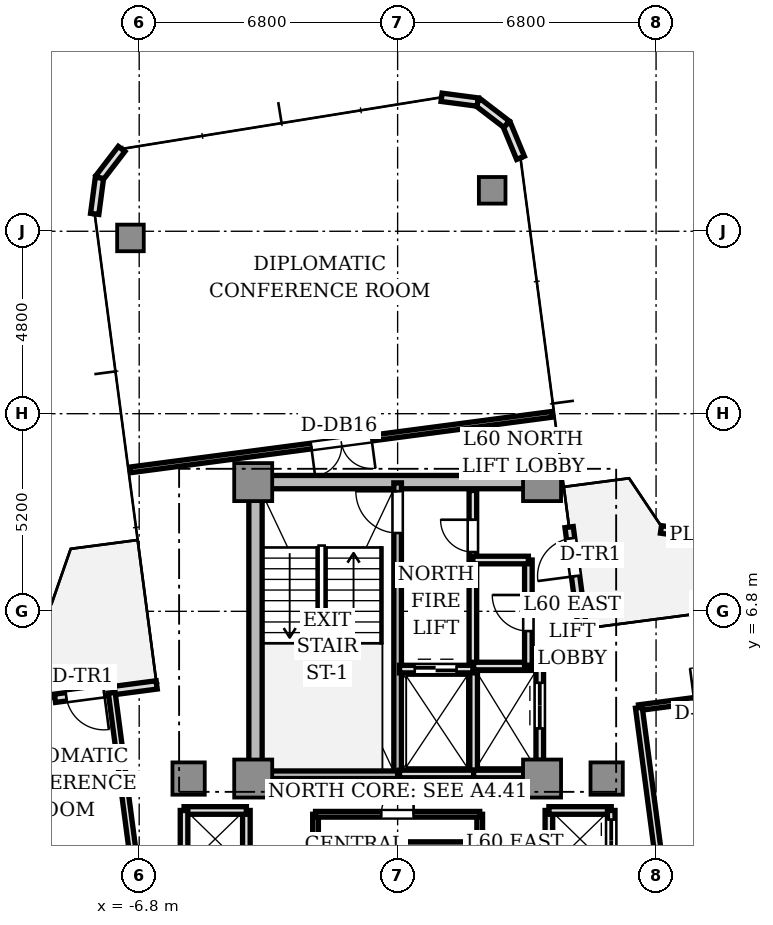
"""IFC4 building model, lengths in metres.
Left out: names, types, materials, properties, quantities, classifications, styles, units other than length and angle.
Written with IfcOpenShell. Run it as: python <this file> out.ifc"""

import sys

from ifc_helpers import new_model, si_unit, direction, frame, frame_2d, origin, origin_2d, place, context, subcontext, project, spatial, rectangle, extrude, source, transform, mapped, element, fill, save


model = new_model("IFC4")
c1 = context("Model", 3, precision=1e-05, world=origin(), true_north=direction((0.0, 1.0)))
c2 = subcontext(c1, "Body", "Model", "MODEL_VIEW")
j1 = project(units=[si_unit("LENGTHUNIT", "METRE"), si_unit("PLANEANGLEUNIT", "RADIAN")], contexts=[c1])
p1 = place(None, origin())
s1 = spatial("IfcSite", under=j1, at=p1, CompositionType="ELEMENT")
p2 = place(p1, origin())
s2 = spatial("IfcBuilding", under=s1, at=p2, CompositionType="ELEMENT")
p3 = place(p2, frame((0.0, 0.0, 216.55)))
s3 = spatial("IfcBuildingStorey", under=s2, at=p3, CompositionType="ELEMENT", Elevation=216.55)
p4 = place(p3, frame((-3.55, 10.2, 0.0), z_axis=(0.0, 0.0, 1.0), x_axis=(1.0, 0.0, 0.0)))
e1 = element("IfcWall", 1, at=p4, inside=s3, PredefinedType="SHEAR", context=c2, shape_type="SweptSolid", body=[
    extrude(rectangle(XDim=7.1, YDim=0.35, at=frame_2d((3.55, 0.0))), origin(), (0.0, 0.0, 1.0), 3.11),
])
p5 = place(p3, frame((-3.74, 2.85, 0.0), z_axis=(0.0, 0.0, 1.0), x_axis=(0.0, 1.0, 0.0)))
e2 = element("IfcWall", 2, at=p5, inside=s3, PredefinedType="SHEAR", context=c2, shape_type="SweptSolid", body=[
    extrude(rectangle(XDim=6.9, YDim=0.35, at=frame_2d((3.45, 0.0))), origin(), (0.0, 0.0, 1.0), 3.11),
])
m1 = source(origin(), c2, "Body", "SweptSolid", [
    extrude(rectangle(XDim=1.0, YDim=1.0, at=origin_2d()), origin(), (0.0, 0.0, 1.0), 3.11),
])
for number, where, z_axis, x_axis in (
    (3, (-3.8, 2.4, 0.0), (0.0, 0.0, 1.0), (1.0, 0.0, 0.0)),
    (4, (3.8, 2.4, 0.0), (0.0, 0.0, 1.0), (1.0, 0.0, 0.0)),
    (5, (-3.8, 10.2, 0.0), (0.0, 0.0, 1.0), (1.0, 0.0, 0.0)),
    (6, (3.8, 10.2, 0.0), (0.0, 0.0, 1.0), (1.0, 0.0, 0.0)),
):
    element("IfcColumn", number, at=place(p3, frame(where, z_axis=z_axis, x_axis=x_axis)), inside=s3, PredefinedType="COLUMN", context=c2, shape_type="MappedRepresentation", body=[
        mapped(m1, transform((0.0, 0.0, 0.0), scale=1.0)),
    ])
m2 = source(origin(), c2, "Body", "SweptSolid", [
    extrude(rectangle(XDim=0.85, YDim=0.85, at=origin_2d()), origin(), (0.0, 0.0, 1.0), 3.11),
])
for number, where, z_axis, x_axis in (
    (7, (5.5, 2.4, 0.0), (0.0, 0.0, 1.0), (1.0, 0.0, 0.0)),
    (8, (-5.5, 2.4, 0.0), (0.0, 0.0, 1.0), (1.0, 0.0, 0.0)),
):
    element("IfcColumn", number, at=place(p3, frame(where, z_axis=z_axis, x_axis=x_axis)), inside=s3, PredefinedType="COLUMN", context=c2, shape_type="MappedRepresentation", body=[
        mapped(m2, transform((0.0, 0.0, 0.0), scale=1.0)),
    ])
m3 = source(origin(), c2, "Body", "SweptSolid", [
    extrude(rectangle(XDim=0.7, YDim=0.7, at=origin_2d()), origin(), (0.0, 0.0, 1.0), 3.11),
])
for number, where, z_axis, x_axis in (
    (9, (2.488, 17.878, 0.0), (0.0, 0.0, 1.0), (1.0, 0.0, 0.0)),
    (10, (-7.03, 16.625, 0.0), (0.0, 0.0, 1.0), (1.0, 0.0, 0.0)),
):
    element("IfcColumn", number, at=place(p3, frame(where, z_axis=z_axis, x_axis=x_axis)), inside=s3, PredefinedType="COLUMN", context=c2, shape_type="MappedRepresentation", body=[
        mapped(m3, transform((0.0, 0.0, 0.0), scale=1.0)),
    ])
p6 = place(p3, frame((4.864, 6.339, 0.0), z_axis=(0.0, 0.0, 1.0), x_axis=(-0.130564442062, 0.991439824936, 0.0)))
e11 = element("IfcWall", 11, at=p6, inside=s3, PredefinedType="STANDARD", context=c2, shape_type="SweptSolid", body=[
    extrude(rectangle(XDim=2.7, YDim=0.22, at=frame_2d((1.35, 0.0))), origin(), (0.0, 0.0, 1.0), 3.11),
])
p7 = place(p6, frame((1.4, 0.0, 0.0)))
e12 = element("IfcOpeningElement", 12, at=p7, cuts=e11, PredefinedType="OPENING", context=c2, shape_type="SweptSolid", body=[
    extrude(rectangle(XDim=1.0, YDim=2.2, at=frame_2d((0.5, 1.1))), frame((0.0, 0.12, 0.0), z_axis=(0.0, -1.0, 0.0), x_axis=(1.0, 0.0, 0.0)), (0.0, 0.0, 1.0), 0.24),
])
for number, where, z_axis, x_axis in (
    (13, (3.233, 18.732, 0.0), (0.0, 0.0, 1.0), (-0.383, 0.924, 0.0)),
    (14, (2.866, 19.617, 0.0), (0.0, 0.0, 1.0), (-0.793, 0.609, 0.0)),
    (15, (2.106, 20.2, 0.0), (0.0, 0.0, 1.0), (-0.991, 0.131, 0.0)),
):
    element("IfcWall", number, at=place(p3, frame(where, z_axis=z_axis, x_axis=x_axis)), inside=s3, PredefinedType="STANDARD", context=c2, shape_type="SweptSolid", body=[
        extrude(rectangle(XDim=0.958, YDim=0.22, at=frame_2d((0.479, 0.0))), origin(), (0.0, 0.0, 1.0), 3.11),
    ])
p8 = place(p3, frame((-7.263, 18.966, 0.0), z_axis=(0.0, 0.0, 1.0), x_axis=(-0.608897151398, -0.793249178392, 0.0)))
e16 = element("IfcWall", 16, at=p8, inside=s3, PredefinedType="STANDARD", context=c2, shape_type="SweptSolid", body=[
    extrude(rectangle(XDim=0.958, YDim=0.22, at=frame_2d((0.479, 0.0))), origin(), (0.0, 0.0, 1.0), 3.11),
])
p9 = place(p3, frame((-7.846, 18.207, 0.0), z_axis=(0.0, 0.0, 1.0), x_axis=(-0.130527053476, -0.991444747987, 0.0)))
e17 = element("IfcWall", 17, at=p9, inside=s3, PredefinedType="STANDARD", context=c2, shape_type="SweptSolid", body=[
    extrude(rectangle(XDim=0.958, YDim=0.22, at=frame_2d((0.479, 0.0))), origin(), (0.0, 0.0, 1.0), 3.11),
])
p10 = place(p3, frame((-6.339, 4.864, 0.0), z_axis=(0.0, 0.0, 1.0), x_axis=(-0.991439824936, -0.130564442062, 0.0)))
e18 = element("IfcWall", 18, at=p10, inside=s3, PredefinedType="STANDARD", context=c2, shape_type="SweptSolid", body=[
    extrude(rectangle(XDim=2.7, YDim=0.22, at=frame_2d((1.35, 0.0))), origin(), (0.0, 0.0, 1.0), 3.11),
])
p11 = place(p10, frame((1.4, 0.0, 0.0)))
e19 = element("IfcOpeningElement", 19, at=p11, cuts=e18, PredefinedType="OPENING", context=c2, shape_type="SweptSolid", body=[
    extrude(rectangle(XDim=1.0, YDim=2.2, at=frame_2d((0.5, 1.1))), frame((0.0, 0.12, 0.0), z_axis=(0.0, -1.0, 0.0), x_axis=(1.0, 0.0, 0.0)), (0.0, 0.0, 1.0), 0.24),
])
p12 = place(p3, frame((8.972, 8.667, 0.0), z_axis=(0.0, 0.0, 1.0), x_axis=(-0.990194035803, 0.139698859907, 0.0)))
e20 = element("IfcWall", 20, at=p12, inside=s3, PredefinedType="PARAPET", context=c2, shape_type="SweptSolid", body=[
    extrude(rectangle(XDim=2.064, YDim=0.2, at=frame_2d((1.032, 0.0))), origin(), (0.0, 0.0, 1.0), 0.65),
])
p13 = place(p3, frame((0.0, 2.5, 0.0), z_axis=(0.0, 0.0, 1.0), x_axis=(0.0, 1.0, 0.0)))
e21 = element("IfcWall", 21, at=p13, inside=s3, PredefinedType="SOLIDWALL", context=c2, shape_type="SweptSolid", body=[
    extrude(rectangle(XDim=7.68, YDim=0.2, at=frame_2d((3.84, 0.0))), origin(), (0.0, 0.0, 1.0), 3.11),
])
p14 = place(p13, frame((6.36, 0.0, 0.0)))
e22 = element("IfcOpeningElement", 22, at=p14, cuts=e21, PredefinedType="OPENING", context=c2, shape_type="SweptSolid", body=[
    extrude(rectangle(XDim=1.1, YDim=2.15, at=frame_2d((0.55, 1.075))), frame((0.0, 0.11, 0.0), z_axis=(0.0, -1.0, 0.0), x_axis=(1.0, 0.0, 0.0)), (0.0, 0.0, 1.0), 0.22),
])
p15 = place(p3, frame((-3.72, 2.5, 0.0), z_axis=(0.0, 0.0, 1.0), x_axis=(1.0, 0.0, 0.0)))
e23 = element("IfcWall", 23, at=p15, inside=s3, PredefinedType="SOLIDWALL", context=c2, shape_type="SweptSolid", body=[
    extrude(rectangle(XDim=3.72, YDim=0.2, at=frame_2d((1.86, 0.0))), origin(), (0.0, 0.0, 1.0), 3.11),
])
p16 = place(p3, frame((1.98, 5.32, 0.0), z_axis=(0.0, 0.0, 1.0), x_axis=(0.0, 1.0, 0.0)))
e24 = element("IfcWall", 24, at=p16, inside=s3, PredefinedType="SOLIDWALL", context=c2, shape_type="SweptSolid", body=[
    extrude(rectangle(XDim=4.66, YDim=0.2, at=frame_2d((2.33, 0.0))), origin(), (0.0, 0.0, 1.0), 2.66),
])
p17 = place(p16, frame((3.04, 0.0, 0.0)))
e25 = element("IfcOpeningElement", 25, at=p17, cuts=e24, PredefinedType="OPENING", context=c2, shape_type="SweptSolid", body=[
    extrude(rectangle(XDim=0.85, YDim=2.1, at=frame_2d((0.425, 1.05))), frame((0.0, 0.11, 0.0), z_axis=(0.0, -1.0, 0.0), x_axis=(1.0, 0.0, 0.0)), (0.0, 0.0, 1.0), 0.22),
])
p18 = place(p3, frame((2.0, 2.5, 0.0), z_axis=(0.0, 0.0, 1.0), x_axis=(0.0, 1.0, 0.0)))
e26 = element("IfcWall", 26, at=p18, inside=s3, PredefinedType="SOLIDWALL", context=c2, shape_type="SweptSolid", body=[
    extrude(rectangle(XDim=2.78, YDim=0.2, at=frame_2d((1.39, 0.0))), origin(), (0.0, 0.0, 1.0), 2.66),
])
p19 = place(p3, frame((0.05, 2.52, 0.0), z_axis=(0.0, 0.0, 1.0), x_axis=(1.0, 0.0, 0.0)))
e27 = element("IfcWall", 27, at=p19, inside=s3, PredefinedType="SOLIDWALL", context=c2, shape_type="SweptSolid", body=[
    extrude(rectangle(XDim=1.95, YDim=0.2, at=frame_2d((0.975, 0.0))), origin(), (0.0, 0.0, 1.0), 2.66),
])
p20 = place(p3, frame((0.05, 5.28, 0.0), z_axis=(0.0, 0.0, 1.0), x_axis=(1.0, 0.0, 0.0)))
e28 = element("IfcWall", 28, at=p20, inside=s3, PredefinedType="SOLIDWALL", context=c2, shape_type="SweptSolid", body=[
    extrude(rectangle(XDim=1.93, YDim=0.2, at=frame_2d((0.965, 0.0))), origin(), (0.0, 0.0, 1.0), 2.66),
])
p21 = place(p20, frame((0.4, 0.0, 0.0)))
e29 = element("IfcOpeningElement", 29, at=p21, cuts=e28, PredefinedType="OPENING", context=c2, shape_type="SweptSolid", body=[
    extrude(rectangle(XDim=1.1, YDim=2.2, at=frame_2d((0.55, 1.1))), frame((0.0, 0.11, 0.0), z_axis=(0.0, -1.0, 0.0), x_axis=(1.0, 0.0, 0.0)), (0.0, 0.0, 1.0), 0.22),
])
p22 = place(p3, frame((2.0, 2.52, 0.0), z_axis=(0.0, 0.0, 1.0), x_axis=(1.0, 0.0, 0.0)))
e30 = element("IfcWall", 30, at=p22, inside=s3, PredefinedType="SOLIDWALL", context=c2, shape_type="SweptSolid", body=[
    extrude(rectangle(XDim=1.32, YDim=0.2, at=frame_2d((0.66, 0.0))), origin(), (0.0, 0.0, 1.0), 2.66),
])
p23 = place(p3, frame((2.0, 5.36, 0.0), z_axis=(0.0, 0.0, 1.0), x_axis=(1.0, 0.0, 0.0)))
e31 = element("IfcWall", 31, at=p23, inside=s3, PredefinedType="SOLIDWALL", context=c2, shape_type="SweptSolid", body=[
    extrude(rectangle(XDim=1.74, YDim=0.2, at=frame_2d((0.87, 0.0))), origin(), (0.0, 0.0, 1.0), 2.66),
])
p24 = place(p3, frame((3.74, 2.88, 0.0), z_axis=(0.0, 0.0, 1.0), x_axis=(0.0, 1.0, 0.0)))
e32 = element("IfcWall", 32, at=p24, inside=s3, PredefinedType="SOLIDWALL", context=c2, shape_type="SweptSolid", body=[
    extrude(rectangle(XDim=2.48, YDim=0.2, at=frame_2d((1.24, 0.0))), origin(), (0.0, 0.0, 1.0), 2.66),
])
p25 = place(p24, frame((0.84, 0.0, 0.0)))
e33 = element("IfcOpeningElement", 33, at=p25, cuts=e32, PredefinedType="OPENING", context=c2, shape_type="SweptSolid", body=[
    extrude(rectangle(XDim=1.2, YDim=2.2, at=frame_2d((0.6, 1.1))), frame((0.0, 0.11, 0.0), z_axis=(0.0, -1.0, 0.0), x_axis=(1.0, 0.0, 0.0)), (0.0, 0.0, 1.0), 0.22),
])
p26 = place(p3, frame((3.98, -1.56, 0.0), z_axis=(0.0, 0.0, 1.0), x_axis=(0.0, 1.0, 0.0)))
e34 = element("IfcWall", 34, at=p26, inside=s3, PredefinedType="SOLIDWALL", context=c2, shape_type="SweptSolid", body=[
    extrude(rectangle(XDim=3.12, YDim=0.2, at=frame_2d((1.56, 0.0))), origin(), (0.0, 0.0, 1.0), 2.33),
])
p27 = place(p3, frame((3.98, 1.56, 0.0), z_axis=(0.0, 0.0, 1.0), x_axis=(1.0, 0.0, 0.0)))
e35 = element("IfcWall", 35, at=p27, inside=s3, PredefinedType="SOLIDWALL", context=c2, shape_type="SweptSolid", body=[
    extrude(rectangle(XDim=1.64, YDim=0.2, at=frame_2d((0.82, 0.0))), origin(), (0.0, 0.0, 1.0), 2.66),
])
p28 = place(p3, frame((5.62, 0.0, 0.0), z_axis=(0.0, 0.0, 1.0), x_axis=(0.0, 1.0, 0.0)))
e36 = element("IfcWall", 36, at=p28, inside=s3, PredefinedType="SOLIDWALL", context=c2, shape_type="SweptSolid", body=[
    extrude(rectangle(XDim=1.56, YDim=0.2, at=frame_2d((0.78, 0.0))), origin(), (0.0, 0.0, 1.0), 2.66),
])
p29 = place(p28, frame((0.22, 0.0, 0.0)))
e37 = element("IfcOpeningElement", 37, at=p29, cuts=e36, PredefinedType="OPENING", context=c2, shape_type="SweptSolid", body=[
    extrude(rectangle(XDim=1.1, YDim=2.2, at=frame_2d((0.55, 1.1))), frame((0.0, 0.11, 0.0), z_axis=(0.0, -1.0, 0.0), x_axis=(1.0, 0.0, 0.0)), (0.0, 0.0, 1.0), 0.22),
])
p30 = place(p3, frame((-3.98, -1.56, 0.0), z_axis=(0.0, 0.0, 1.0), x_axis=(0.0, 1.0, 0.0)))
e38 = element("IfcWall", 38, at=p30, inside=s3, PredefinedType="SOLIDWALL", context=c2, shape_type="SweptSolid", body=[
    extrude(rectangle(XDim=3.12, YDim=0.2, at=frame_2d((1.56, 0.0))), origin(), (0.0, 0.0, 1.0), 2.33),
])
p31 = place(p3, frame((-5.62, 1.56, 0.0), z_axis=(0.0, 0.0, 1.0), x_axis=(1.0, 0.0, 0.0)))
e39 = element("IfcWall", 39, at=p31, inside=s3, PredefinedType="SOLIDWALL", context=c2, shape_type="SweptSolid", body=[
    extrude(rectangle(XDim=1.64, YDim=0.2, at=frame_2d((0.82, 0.0))), origin(), (0.0, 0.0, 1.0), 2.66),
])
p32 = place(p3, frame((-5.62, 0.0, 0.0), z_axis=(0.0, 0.0, 1.0), x_axis=(0.0, 1.0, 0.0)))
e40 = element("IfcWall", 40, at=p32, inside=s3, PredefinedType="SOLIDWALL", context=c2, shape_type="SweptSolid", body=[
    extrude(rectangle(XDim=1.56, YDim=0.2, at=frame_2d((0.78, 0.0))), origin(), (0.0, 0.0, 1.0), 2.66),
])
p33 = place(p3, frame((3.44, 5.38, 0.0), z_axis=(0.0, 0.0, 1.0), x_axis=(0.0, 1.0, 0.0)))
e41 = element("IfcWall", 41, at=p33, inside=s3, PredefinedType="SOLIDWALL", context=c2, shape_type="SweptSolid", body=[
    extrude(rectangle(XDim=2.77, YDim=0.2, at=frame_2d((1.385, 0.0))), origin(), (0.0, 0.0, 1.0), 2.66),
])
p34 = place(p33, frame((0.9, 0.0, 0.0)))
e42 = element("IfcOpeningElement", 42, at=p34, cuts=e41, PredefinedType="OPENING", context=c2, shape_type="SweptSolid", body=[
    extrude(rectangle(XDim=0.95, YDim=2.15, at=frame_2d((0.475, 1.075))), frame((0.0, 0.11, 0.0), z_axis=(0.0, -1.0, 0.0), x_axis=(1.0, 0.0, 0.0)), (0.0, 0.0, 1.0), 0.22),
])
p35 = place(p3, frame((1.98, 8.15, 0.0), z_axis=(0.0, 0.0, 1.0), x_axis=(1.0, 0.0, 0.0)))
e43 = element("IfcWall", 43, at=p35, inside=s3, PredefinedType="SOLIDWALL", context=c2, shape_type="SweptSolid", body=[
    extrude(rectangle(XDim=1.46, YDim=0.2, at=frame_2d((0.73, 0.0))), origin(), (0.0, 0.0, 1.0), 2.66),
])
p36 = place(p3, frame((2.16, -1.46, 0.0), z_axis=(0.0, 0.0, 1.0), x_axis=(0.0, 1.0, 0.0)))
e44 = element("IfcWall", 44, at=p36, inside=s3, PredefinedType="PARTITIONING", context=c2, shape_type="SweptSolid", body=[
    extrude(rectangle(XDim=2.92, YDim=0.15, at=frame_2d((1.46, 0.0))), origin(), (0.0, 0.0, 1.0), 2.66),
])
p37 = place(p36, frame((1.035, 0.0, 0.0)))
e45 = element("IfcOpeningElement", 45, at=p37, cuts=e44, PredefinedType="OPENING", context=c2, shape_type="SweptSolid", body=[
    extrude(rectangle(XDim=0.85, YDim=2.1, at=frame_2d((0.425, 1.05))), frame((0.0, 0.085, 0.0), z_axis=(0.0, -1.0, 0.0), x_axis=(1.0, 0.0, 0.0)), (0.0, 0.0, 1.0), 0.17),
])
p38 = place(p3, frame((-2.16, -1.46, 0.0), z_axis=(0.0, 0.0, 1.0), x_axis=(0.0, 1.0, 0.0)))
e46 = element("IfcWall", 46, at=p38, inside=s3, PredefinedType="PARTITIONING", context=c2, shape_type="SweptSolid", body=[
    extrude(rectangle(XDim=2.92, YDim=0.15, at=frame_2d((1.46, 0.0))), origin(), (0.0, 0.0, 1.0), 2.66),
])
p39 = place(p3, frame((-2.16, 1.46, 0.0), z_axis=(0.0, 0.0, 1.0), x_axis=(1.0, 0.0, 0.0)))
e47 = element("IfcWall", 47, at=p39, inside=s3, PredefinedType="PARTITIONING", context=c2, shape_type="SweptSolid", body=[
    extrude(rectangle(XDim=4.32, YDim=0.15, at=frame_2d((2.16, 0.0))), origin(), (0.0, 0.0, 1.0), 2.66),
])
p40 = place(p39, frame((1.73, 0.0, 0.0)))
e48 = element("IfcOpeningElement", 48, at=p40, cuts=e47, PredefinedType="OPENING", context=c2, shape_type="SweptSolid", body=[
    extrude(rectangle(XDim=0.85, YDim=2.1, at=frame_2d((0.425, 1.05))), frame((0.0, 0.085, 0.0), z_axis=(0.0, -1.0, 0.0), x_axis=(1.0, 0.0, 0.0)), (0.0, 0.0, 1.0), 0.17),
])
p41 = place(p3, frame((-2.16, 0.66, 0.0), z_axis=(0.0, 0.0, 1.0), x_axis=(1.0, 0.0, 0.0)))
e49 = element("IfcWall", 49, at=p41, inside=s3, PredefinedType="PARTITIONING", context=c2, shape_type="SweptSolid", body=[
    extrude(rectangle(XDim=4.32, YDim=0.15, at=frame_2d((2.16, 0.0))), origin(), (0.0, 0.0, 1.0), 2.66),
])
p42 = place(p3, frame((6.348, 4.265, 0.0), z_axis=(0.0, 0.0, 1.0), x_axis=(0.991443573086, 0.130535977363, 0.0)))
e50 = element("IfcWall", 50, at=p42, inside=s3, PredefinedType="PARTITIONING", context=c2, shape_type="SweptSolid", body=[
    extrude(rectangle(XDim=8.45, YDim=0.15, at=frame_2d((4.225, 0.0))), origin(), (0.0, 0.0, 1.0), 2.66),
])
p43 = place(p42, frame((1.469, 0.0, 0.0)))
e51 = element("IfcOpeningElement", 51, at=p43, cuts=e50, PredefinedType="OPENING", context=c2, shape_type="SweptSolid", body=[
    extrude(rectangle(XDim=0.85, YDim=2.1, at=frame_2d((0.425, 1.05))), frame((0.0, 0.085, 0.0), z_axis=(0.0, -1.0, 0.0), x_axis=(1.0, 0.0, 0.0)), (0.0, 0.0, 1.0), 0.17),
])
p44 = place(p42, frame((4.719, 0.0, 0.0)))
e52 = element("IfcOpeningElement", 52, at=p44, cuts=e50, PredefinedType="OPENING", context=c2, shape_type="SweptSolid", body=[
    extrude(rectangle(XDim=0.85, YDim=2.1, at=frame_2d((0.425, 1.05))), frame((0.0, 0.085, 0.0), z_axis=(0.0, -1.0, 0.0), x_axis=(1.0, 0.0, 0.0)), (0.0, 0.0, 1.0), 0.17),
])
p45 = place(p3, frame((7.522, -4.658, 0.0), z_axis=(0.0, 0.0, 1.0), x_axis=(-0.130509247021, 0.991447092104, 0.0)))
e53 = element("IfcWall", 53, at=p45, inside=s3, PredefinedType="PARTITIONING", context=c2, shape_type="SweptSolid", body=[
    extrude(rectangle(XDim=9.0, YDim=0.18, at=frame_2d((4.5, 0.0))), origin(), (0.0, 0.0, 1.0), 2.66),
])
p46 = place(p3, frame((4.071, 11.984, 0.0), z_axis=(0.0, 0.0, 1.0), x_axis=(-0.991444721874, -0.130527251821, 0.0)))
e54 = element("IfcWall", 54, at=p46, inside=s3, PredefinedType="PARTITIONING", context=c2, shape_type="SweptSolid", body=[
    extrude(rectangle(XDim=11.2, YDim=0.15, at=frame_2d((5.6, 0.0))), origin(), (0.0, 0.0, 1.0), 2.66),
])
p47 = place(p46, frame((4.8, 0.0, 0.0)))
e55 = element("IfcOpeningElement", 55, at=p47, cuts=e54, PredefinedType="OPENING", context=c2, shape_type="SweptSolid", body=[
    extrude(rectangle(XDim=1.6, YDim=2.25, at=frame_2d((0.8, 1.125))), frame((0.0, 0.085, 0.0), z_axis=(0.0, -1.0, 0.0), x_axis=(1.0, 0.0, 0.0)), (0.0, 0.0, 1.0), 0.17),
])
p48 = place(p3, frame((-7.522, 4.658, 0.0), z_axis=(0.0, 0.0, 1.0), x_axis=(0.130526496103, -0.991444821367, 0.0)))
e56 = element("IfcWall", 56, at=p48, inside=s3, PredefinedType="PARTITIONING", context=c2, shape_type="SweptSolid", body=[
    extrude(rectangle(XDim=4.65, YDim=0.18, at=frame_2d((2.325, 0.0))), origin(), (0.0, 0.0, 1.0), 2.66),
])
m4 = source(origin(), c2, "Body", "SweptSolid", [
    extrude(rectangle(XDim=1.0, YDim=0.05, at=origin_2d()), origin(), (0.0, 0.0, 1.0), 2.2),
])
p49 = place(p7, frame((0.5, 0.0, 0.0)))
e57 = element("IfcDoor", 57, at=p49, inside=s3, OperationType="SINGLE_SWING_LEFT", PredefinedType="DOOR", context=c2, shape_type="MappedRepresentation", body=[
    mapped(m4, transform((0.0, 0.0, 0.0), scale=1.0)),
])
fill(e12, e57)
p50 = place(p11, frame((0.5, 0.0, 0.0)))
e58 = element("IfcDoor", 58, at=p50, inside=s3, OperationType="SINGLE_SWING_LEFT", PredefinedType="DOOR", context=c2, shape_type="MappedRepresentation", body=[
    mapped(m4, transform((0.0, 0.0, 0.0), scale=1.0)),
])
fill(e19, e58)
m5 = source(origin(), c2, "Body", "SweptSolid", [
    extrude(rectangle(XDim=1.1, YDim=0.05, at=origin_2d()), origin(), (0.0, 0.0, 1.0), 2.15),
])
p51 = place(p14, frame((0.55, 0.0, 0.0)))
e59 = element("IfcDoor", 59, at=p51, inside=s3, OperationType="SINGLE_SWING_RIGHT", PredefinedType="DOOR", context=c2, shape_type="MappedRepresentation", body=[
    mapped(m5, transform((0.0, 0.0, 0.0), scale=1.0)),
])
fill(e22, e59)
m6 = source(origin(), c2, "Body", "SweptSolid", [
    extrude(rectangle(XDim=0.85, YDim=0.05, at=origin_2d()), origin(), (0.0, 0.0, 1.0), 2.1),
])
p52 = place(p17, frame((0.425, 0.0, 0.0)))
e60 = element("IfcDoor", 60, at=p52, inside=s3, OperationType="SINGLE_SWING_RIGHT", PredefinedType="DOOR", context=c2, shape_type="MappedRepresentation", body=[
    mapped(m6, transform((0.0, 0.0, 0.0), scale=1.0)),
])
fill(e25, e60)
m7 = source(origin(), c2, "Body", "SweptSolid", [
    extrude(rectangle(XDim=1.1, YDim=0.05, at=origin_2d()), origin(), (0.0, 0.0, 1.0), 2.2),
])
p53 = place(p21, frame((0.55, 0.0, 0.0)))
e61 = element("IfcDoor", 61, at=p53, inside=s3, OperationType="DOUBLE_DOOR_SLIDING", PredefinedType="DOOR", context=c2, shape_type="MappedRepresentation", body=[
    mapped(m7, transform((0.0, 0.0, 0.0), scale=1.0)),
])
fill(e29, e61)
m8 = source(origin(), c2, "Body", "SweptSolid", [
    extrude(rectangle(XDim=1.2, YDim=0.05, at=origin_2d()), origin(), (0.0, 0.0, 1.0), 2.2),
])
p54 = place(p25, frame((0.6, 0.0, 0.0)))
e62 = element("IfcDoor", 62, at=p54, inside=s3, OperationType="DOUBLE_DOOR_SLIDING", PredefinedType="DOOR", context=c2, shape_type="MappedRepresentation", body=[
    mapped(m8, transform((0.0, 0.0, 0.0), scale=1.0)),
])
fill(e33, e62)
p55 = place(p29, frame((0.55, 0.0, 0.0)))
e63 = element("IfcDoor", 63, at=p55, inside=s3, OperationType="DOUBLE_DOOR_SLIDING", PredefinedType="DOOR", context=c2, shape_type="MappedRepresentation", body=[
    mapped(m7, transform((0.0, 0.0, 0.0), scale=1.0)),
])
fill(e37, e63)
m9 = source(origin(), c2, "Body", "SweptSolid", [
    extrude(rectangle(XDim=0.95, YDim=0.05, at=origin_2d()), origin(), (0.0, 0.0, 1.0), 2.15),
])
p56 = place(p34, frame((0.475, 0.0, 0.0)))
e64 = element("IfcDoor", 64, at=p56, inside=s3, OperationType="SINGLE_SWING_RIGHT", PredefinedType="DOOR", context=c2, shape_type="MappedRepresentation", body=[
    mapped(m9, transform((0.0, 0.0, 0.0), scale=1.0)),
])
fill(e42, e64)
p57 = place(p40, frame((0.425, 0.0, 0.0)))
e65 = element("IfcDoor", 65, at=p57, inside=s3, OperationType="SINGLE_SWING_RIGHT", PredefinedType="DOOR", context=c2, shape_type="MappedRepresentation", body=[
    mapped(m6, transform((0.0, 0.0, 0.0), scale=1.0)),
])
fill(e48, e65)
m10 = source(origin(), c2, "Body", "SweptSolid", [
    extrude(rectangle(XDim=1.6, YDim=0.05, at=origin_2d()), origin(), (0.0, 0.0, 1.0), 2.25),
])
p58 = place(p47, frame((0.8, 0.0, 0.0)))
e66 = element("IfcDoor", 66, at=p58, inside=s3, OperationType="DOUBLE_DOOR_SINGLE_SWING", PredefinedType="DOOR", context=c2, shape_type="MappedRepresentation", body=[
    mapped(m10, transform((0.0, 0.0, 0.0), scale=1.0)),
])
fill(e55, e66)
save(model, sys.argv[1])
